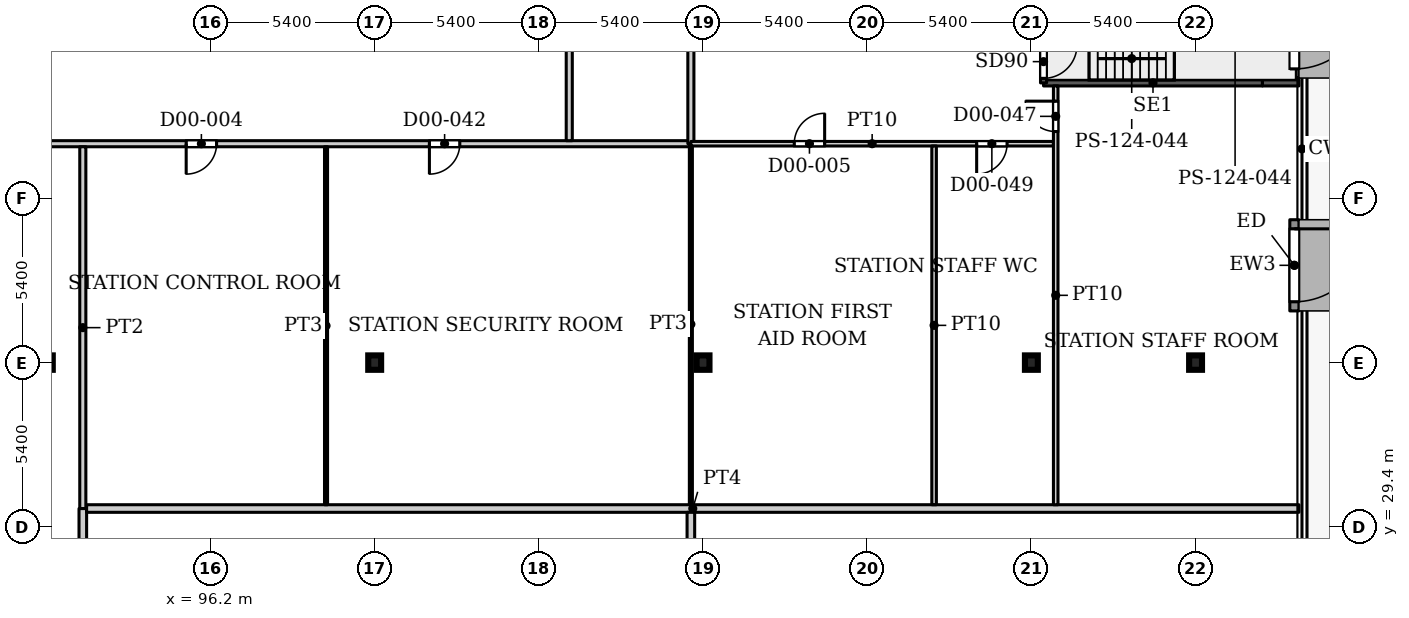
"""IFC4 building model, lengths in metres.
Left out: names, types, materials, properties, quantities, classifications, styles, units other than length and angle.
Written with IfcOpenShell. Run it as: python <this file> out.ifc"""

import sys

from ifc_helpers import new_model, si_unit, direction, frame, frame_2d, origin, origin_2d, place, context, subcontext, project, spatial, rectangle, i_section, extrude, source, transform, mapped, element, fill, save


model = new_model("IFC4")
c1 = context("Model", 3, precision=1e-05, world=origin(), true_north=direction((0.0, 1.0)))
c2 = subcontext(c1, "Body", "Model", "MODEL_VIEW")
j1 = project(units=[si_unit("LENGTHUNIT", "METRE"), si_unit("PLANEANGLEUNIT", "RADIAN")], contexts=[c1])
p1 = place(None, origin())
s1 = spatial("IfcSite", under=j1, at=p1, CompositionType="ELEMENT")
p2 = place(p1, origin())
s2 = spatial("IfcBuilding", under=s1, at=p2, CompositionType="ELEMENT")
p3 = place(p2, origin())
s3 = spatial("IfcBuildingStorey", under=s2, at=p3, CompositionType="ELEMENT", Elevation=0.0)
for number, where, z_axis, x_axis in (
    (1, (90.8, 34.8, 0.0), (0.0, 0.0, 1.0), (1.0, 0.0, 0.0)),
    (2, (101.6, 34.8, 0.0), (0.0, 0.0, 1.0), (1.0, 0.0, 0.0)),
    (3, (112.4, 34.8, 0.0), (0.0, 0.0, 1.0), (1.0, 0.0, 0.0)),
    (4, (123.2, 34.8, 0.0), (0.0, 0.0, 1.0), (1.0, 0.0, 0.0)),
    (5, (128.6, 34.8, 0.0), (0.0, 0.0, 1.0), (1.0, 0.0, 0.0)),
):
    element("IfcColumn", number, at=place(p3, frame(where, z_axis=z_axis, x_axis=x_axis)), inside=s3, PredefinedType="COLUMN", context=c2, shape_type="SweptSolid", body=[
        extrude(i_section(OverallWidth=0.424, OverallDepth=0.474, WebThickness=0.048, FlangeThickness=0.077, FilletRadius=0.014, at=origin_2d()), origin(), (0.0, 0.0, 1.0), 7.5),
    ])
p4 = place(p3, frame((131.85, 47.16, 0.0), z_axis=(0.0, 0.0, 1.0), x_axis=(0.0, -1.0, 0.0)))
e6 = element("IfcWall", 6, at=p4, inside=s3, PredefinedType="SOLIDWALL", context=c2, shape_type="SweptSolid", body=[
    extrude(rectangle(XDim=3.0, YDim=0.3, at=frame_2d((1.5, 0.0))), origin(), (0.0, 0.0, 1.0), 7.25),
])
p5 = place(p4, frame((0.3, 0.0, 0.0)))
e7 = element("IfcOpeningElement", 7, at=p5, cuts=e6, PredefinedType="OPENING", context=c2, shape_type="SweptSolid", body=[
    extrude(rectangle(XDim=2.4, YDim=2.7, at=frame_2d((1.2, 1.35))), frame((0.0, 0.16, 0.0), z_axis=(0.0, -1.0, 0.0), x_axis=(1.0, 0.0, 0.0)), (0.0, 0.0, 1.0), 0.32),
])
p6 = place(p3, frame((131.85, 39.5, 0.0), z_axis=(0.0, 0.0, 1.0), x_axis=(0.0, -1.0, 0.0)))
e8 = element("IfcWall", 8, at=p6, inside=s3, PredefinedType="SOLIDWALL", context=c2, shape_type="SweptSolid", body=[
    extrude(rectangle(XDim=3.0, YDim=0.3, at=frame_2d((1.5, 0.0))), origin(), (0.0, 0.0, 1.0), 7.25),
])
p7 = place(p6, frame((0.3, 0.0, 0.0)))
e9 = element("IfcOpeningElement", 9, at=p7, cuts=e8, PredefinedType="OPENING", context=c2, shape_type="SweptSolid", body=[
    extrude(rectangle(XDim=2.4, YDim=2.7, at=frame_2d((1.2, 1.35))), frame((0.0, 0.16, 0.0), z_axis=(0.0, -1.0, 0.0), x_axis=(1.0, 0.0, 0.0)), (0.0, 0.0, 1.0), 0.32),
])
p8 = place(p3, frame((123.6, 44.0, 0.0), z_axis=(0.0, 0.0, 1.0), x_axis=(1.0, 0.0, 0.0)))
e10 = element("IfcWall", 10, at=p8, inside=s3, PredefinedType="SHEAR", context=c2, shape_type="SweptSolid", body=[
    extrude(rectangle(XDim=7.2, YDim=0.2, at=frame_2d((3.6, 0.0))), origin(), (0.0, 0.0, 1.0), 7.5),
])
p9 = place(p3, frame((130.8, 44.0, 0.0), z_axis=(0.0, 0.0, 1.0), x_axis=(1.0, 0.0, 0.0)))
e11 = element("IfcWall", 11, at=p9, inside=s3, PredefinedType="SHEAR", context=c2, shape_type="SweptSolid", body=[
    extrude(rectangle(XDim=1.2, YDim=0.2, at=frame_2d((0.6, 0.0))), origin(), (0.0, 0.0, 1.0), 7.5),
])
p10 = place(p3, frame((123.6, 44.0, 0.0), z_axis=(0.0, 0.0, 1.0), x_axis=(0.0, 1.0, 0.0)))
e12 = element("IfcWall", 12, at=p10, inside=s3, PredefinedType="SHEAR", context=c2, shape_type="SweptSolid", body=[
    extrude(rectangle(XDim=3.15, YDim=0.2, at=frame_2d((1.575, 0.0))), origin(), (0.0, 0.0, 1.0), 7.5),
])
p11 = place(p10, frame((0.15, 0.0, 0.0)))
e13 = element("IfcOpeningElement", 13, at=p11, cuts=e12, PredefinedType="OPENING", context=c2, shape_type="SweptSolid", body=[
    extrude(rectangle(XDim=1.1, YDim=2.2, at=frame_2d((0.55, 1.1))), frame((0.0, 0.11, 0.0), z_axis=(0.0, -1.0, 0.0), x_axis=(1.0, 0.0, 0.0)), (0.0, 0.0, 1.0), 0.22),
])
p12 = place(p3, frame((47.9, 42.0, 0.0), z_axis=(0.0, 0.0, 1.0), x_axis=(1.0, 0.0, 0.0)))
e14 = element("IfcWall", 14, at=p12, inside=s3, PredefinedType="PARTITIONING", context=c2, shape_type="SweptSolid", body=[
    extrude(rectangle(XDim=64.1, YDim=0.2, at=frame_2d((32.05, 0.0))), origin(), (0.0, 0.0, 1.0), 7.08),
])
p13 = place(p12, frame((47.5, 0.0, 0.0)))
e15 = element("IfcOpeningElement", 15, at=p13, cuts=e14, PredefinedType="OPENING", context=c2, shape_type="SweptSolid", body=[
    extrude(rectangle(XDim=1.0, YDim=2.1, at=frame_2d((0.5, 1.05))), frame((0.0, 0.11, 0.0), z_axis=(0.0, -1.0, 0.0), x_axis=(1.0, 0.0, 0.0)), (0.0, 0.0, 1.0), 0.22),
])
p14 = place(p12, frame((55.5, 0.0, 0.0)))
e16 = element("IfcOpeningElement", 16, at=p14, cuts=e14, PredefinedType="OPENING", context=c2, shape_type="SweptSolid", body=[
    extrude(rectangle(XDim=1.0, YDim=2.1, at=frame_2d((0.5, 1.05))), frame((0.0, 0.11, 0.0), z_axis=(0.0, -1.0, 0.0), x_axis=(1.0, 0.0, 0.0)), (0.0, 0.0, 1.0), 0.22),
])
p15 = place(p3, frame((92.0, 20.725, 0.0), z_axis=(0.0, 0.0, 1.0), x_axis=(0.0, 1.0, 0.0)))
e17 = element("IfcWall", 17, at=p15, inside=s3, PredefinedType="PARTITIONING", context=c2, shape_type="SweptSolid", body=[
    extrude(rectangle(XDim=9.275, YDim=0.25, at=frame_2d((4.637, 0.0))), origin(), (0.0, 0.0, 1.0), 7.08),
])
p16 = place(p3, frame((92.0, 30.0, 0.0), z_axis=(0.0, 0.0, 1.0), x_axis=(0.0, 1.0, 0.0)))
e18 = element("IfcWall", 18, at=p16, inside=s3, PredefinedType="PARTITIONING", context=c2, shape_type="SweptSolid", body=[
    extrude(rectangle(XDim=11.9, YDim=0.2, at=frame_2d((5.95, 0.0))), origin(), (0.0, 0.0, 1.0), 7.08),
])
p17 = place(p3, frame((92.125, 30.0, 0.0), z_axis=(0.0, 0.0, 1.0), x_axis=(1.0, 0.0, 0.0)))
e19 = element("IfcWall", 19, at=p17, inside=s3, PredefinedType="PARTITIONING", context=c2, shape_type="SweptSolid", body=[
    extrude(rectangle(XDim=39.875, YDim=0.25, at=frame_2d((19.938, 0.0))), origin(), (0.0, 0.0, 1.0), 7.08),
])
p18 = place(p3, frame((100.0, 30.125, 0.0), z_axis=(0.0, 0.0, 1.0), x_axis=(0.0, 1.0, 0.0)))
e20 = element("IfcWall", 20, at=p18, inside=s3, PredefinedType="PARTITIONING", context=c2, shape_type="SweptSolid", body=[
    extrude(rectangle(XDim=11.775, YDim=0.1, at=frame_2d((5.887, 0.0))), origin(), (0.0, 0.0, 1.0), 7.08),
])
p19 = place(p3, frame((108.0, 42.1, 0.0), z_axis=(0.0, 0.0, 1.0), x_axis=(0.0, 1.0, 0.0)))
e21 = element("IfcWall", 21, at=p19, inside=s3, PredefinedType="PARTITIONING", context=c2, shape_type="SweptSolid", body=[
    extrude(rectangle(XDim=35.9, YDim=0.2, at=frame_2d((17.95, 0.0))), origin(), (0.0, 0.0, 1.0), 7.08),
])
p20 = place(p19, frame((16.5, 0.0, 0.0)))
e22 = element("IfcOpeningElement", 22, at=p20, cuts=e21, PredefinedType="OPENING", context=c2, shape_type="SweptSolid", body=[
    extrude(rectangle(XDim=3.0, YDim=2.1, at=frame_2d((1.5, 1.05))), frame((0.0, 0.11, 0.0), z_axis=(0.0, -1.0, 0.0), x_axis=(1.0, 0.0, 0.0)), (0.0, 0.0, 1.0), 0.22),
])
p21 = place(p3, frame((112.0, 20.725, 0.0), z_axis=(0.0, 0.0, 1.0), x_axis=(0.0, 1.0, 0.0)))
e23 = element("IfcWall", 23, at=p21, inside=s3, PredefinedType="PARTITIONING", context=c2, shape_type="SweptSolid", body=[
    extrude(rectangle(XDim=9.15, YDim=0.25, at=frame_2d((4.575, 0.0))), origin(), (0.0, 0.0, 1.0), 7.08),
])
p22 = place(p3, frame((112.0, 30.125, 0.0), z_axis=(0.0, 0.0, 1.0), x_axis=(0.0, 1.0, 0.0)))
e24 = element("IfcWall", 24, at=p22, inside=s3, PredefinedType="PARTITIONING", context=c2, shape_type="SweptSolid", body=[
    extrude(rectangle(XDim=11.875, YDim=0.1, at=frame_2d((5.938, 0.0))), origin(), (0.0, 0.0, 1.0), 7.08),
])
p23 = place(p3, frame((112.0, 42.0, 0.0), z_axis=(0.0, 0.0, 1.0), x_axis=(0.0, 1.0, 0.0)))
e25 = element("IfcWall", 25, at=p23, inside=s3, PredefinedType="PARTITIONING", context=c2, shape_type="SweptSolid", body=[
    extrude(rectangle(XDim=22.0, YDim=0.2, at=frame_2d((11.0, 0.0))), origin(), (0.0, 0.0, 1.0), 7.08),
])
p24 = place(p23, frame((9.6, 0.0, 0.0)))
e26 = element("IfcOpeningElement", 26, at=p24, cuts=e25, PredefinedType="OPENING", context=c2, shape_type="SweptSolid", body=[
    extrude(rectangle(XDim=3.0, YDim=2.1, at=frame_2d((1.5, 1.05))), frame((0.0, 0.11, 0.0), z_axis=(0.0, -1.0, 0.0), x_axis=(1.0, 0.0, 0.0)), (0.0, 0.0, 1.0), 0.22),
])
p25 = place(p3, frame((112.0, 42.0, 0.0), z_axis=(0.0, 0.0, 1.0), x_axis=(1.0, 0.0, 0.0)))
e27 = element("IfcWall", 27, at=p25, inside=s3, PredefinedType="PARTITIONING", context=c2, shape_type="SweptSolid", body=[
    extrude(rectangle(XDim=11.925, YDim=0.15, at=frame_2d((5.962, 0.0))), origin(), (0.0, 0.0, 1.0), 7.08),
])
p26 = place(p25, frame((3.4, 0.0, 0.0)))
e28 = element("IfcOpeningElement", 28, at=p26, cuts=e27, PredefinedType="OPENING", context=c2, shape_type="SweptSolid", body=[
    extrude(rectangle(XDim=1.0, YDim=2.1, at=frame_2d((0.5, 1.05))), frame((0.0, 0.085, 0.0), z_axis=(0.0, -1.0, 0.0), x_axis=(1.0, 0.0, 0.0)), (0.0, 0.0, 1.0), 0.17),
])
p27 = place(p25, frame((9.4, 0.0, 0.0)))
e29 = element("IfcOpeningElement", 29, at=p27, cuts=e27, PredefinedType="OPENING", context=c2, shape_type="SweptSolid", body=[
    extrude(rectangle(XDim=1.0, YDim=2.1, at=frame_2d((0.5, 1.05))), frame((0.0, 0.085, 0.0), z_axis=(0.0, -1.0, 0.0), x_axis=(1.0, 0.0, 0.0)), (0.0, 0.0, 1.0), 0.17),
])
p28 = place(p3, frame((120.0, 30.125, 0.0), z_axis=(0.0, 0.0, 1.0), x_axis=(0.0, 1.0, 0.0)))
e30 = element("IfcWall", 30, at=p28, inside=s3, PredefinedType="PARTITIONING", context=c2, shape_type="SweptSolid", body=[
    extrude(rectangle(XDim=11.8, YDim=0.15, at=frame_2d((5.9, 0.0))), origin(), (0.0, 0.0, 1.0), 7.08),
])
p29 = place(p3, frame((124.0, 30.125, 0.0), z_axis=(0.0, 0.0, 1.0), x_axis=(0.0, 1.0, 0.0)))
e31 = element("IfcWall", 31, at=p29, inside=s3, PredefinedType="PARTITIONING", context=c2, shape_type="SweptSolid", body=[
    extrude(rectangle(XDim=13.776, YDim=0.15, at=frame_2d((6.888, 0.0))), origin(), (0.0, 0.0, 1.0), 7.08),
])
p30 = place(p29, frame((12.275, 0.0, 0.0)))
e32 = element("IfcOpeningElement", 32, at=p30, cuts=e31, PredefinedType="OPENING", context=c2, shape_type="SweptSolid", body=[
    extrude(rectangle(XDim=1.0, YDim=2.1, at=frame_2d((0.5, 1.05))), frame((0.0, 0.085, 0.0), z_axis=(0.0, -1.0, 0.0), x_axis=(1.0, 0.0, 0.0)), (0.0, 0.0, 1.0), 0.17),
])
m1 = source(origin(), c2, "Body", "SweptSolid", [
    extrude(rectangle(XDim=2.4, YDim=2.7, at=frame_2d((1.2, 1.35))), frame((0.0, 0.025, 0.0), z_axis=(0.0, -1.0, 0.0), x_axis=(1.0, 0.0, 0.0)), (0.0, 0.0, 1.0), 0.05),
])
p31 = place(p5, origin())
e33 = element("IfcDoor", 33, at=p31, inside=s3, OperationType="DOUBLE_DOOR_SINGLE_SWING", PredefinedType="DOOR", context=c2, shape_type="MappedRepresentation", body=[
    mapped(m1, transform((0.0, 0.0, 0.0), x_axis=(1.0, 0.0, 0.0), y_axis=(0.0, 1.0, 0.0), z_axis=(0.0, 0.0, 1.0), scale=1.0)),
])
fill(e7, e33)
p32 = place(p7, origin())
e34 = element("IfcDoor", 34, at=p32, inside=s3, OperationType="DOUBLE_DOOR_SINGLE_SWING", PredefinedType="DOOR", context=c2, shape_type="MappedRepresentation", body=[
    mapped(m1, transform((0.0, 0.0, 0.0), x_axis=(1.0, 0.0, 0.0), y_axis=(0.0, 1.0, 0.0), z_axis=(0.0, 0.0, 1.0), scale=1.0)),
])
fill(e9, e34)
m2 = source(origin(), c2, "Body", "SweptSolid", [
    extrude(rectangle(XDim=1.1, YDim=2.2, at=frame_2d((0.55, 1.1))), frame((0.0, 0.025, 0.0), z_axis=(0.0, -1.0, 0.0), x_axis=(1.0, 0.0, 0.0)), (0.0, 0.0, 1.0), 0.05),
])
p33 = place(p11, origin())
e35 = element("IfcDoor", 35, at=p33, inside=s3, OperationType="SINGLE_SWING_RIGHT", PredefinedType="DOOR", context=c2, shape_type="MappedRepresentation", body=[
    mapped(m2, transform((0.0, 0.0, 0.0), x_axis=(1.0, 0.0, 0.0), y_axis=(0.0, 1.0, 0.0), z_axis=(0.0, 0.0, 1.0), scale=1.0)),
])
fill(e13, e35)
m3 = source(origin(), c2, "Body", "SweptSolid", [
    extrude(rectangle(XDim=1.0, YDim=2.1, at=frame_2d((0.5, 1.05))), frame((0.0, 0.025, 0.0), z_axis=(0.0, -1.0, 0.0), x_axis=(1.0, 0.0, 0.0)), (0.0, 0.0, 1.0), 0.05),
])
p34 = place(p13, origin())
e36 = element("IfcDoor", 36, at=p34, inside=s3, OperationType="SINGLE_SWING_RIGHT", PredefinedType="DOOR", context=c2, shape_type="MappedRepresentation", body=[
    mapped(m3, transform((0.0, 0.0, 0.0), x_axis=(1.0, 0.0, 0.0), y_axis=(0.0, 1.0, 0.0), z_axis=(0.0, 0.0, 1.0), scale=1.0)),
])
fill(e15, e36)
m4 = source(origin(), c2, "Body", "SweptSolid", [
    extrude(rectangle(XDim=1.0, YDim=2.1, at=frame_2d((0.5, 1.05))), frame((0.0, 0.025, 0.0), z_axis=(0.0, -1.0, 0.0), x_axis=(1.0, 0.0, 0.0)), (0.0, 0.0, 1.0), 0.05),
])
p35 = place(p26, origin())
e37 = element("IfcDoor", 37, at=p35, inside=s3, OperationType="SINGLE_SWING_LEFT", PredefinedType="DOOR", context=c2, shape_type="MappedRepresentation", body=[
    mapped(m4, transform((0.0, 0.0, 0.0), x_axis=(1.0, 0.0, 0.0), y_axis=(0.0, 1.0, 0.0), z_axis=(0.0, 0.0, 1.0), scale=1.0)),
])
fill(e28, e37)
p36 = place(p14, origin())
e38 = element("IfcDoor", 38, at=p36, inside=s3, OperationType="SINGLE_SWING_RIGHT", PredefinedType="DOOR", context=c2, shape_type="MappedRepresentation", body=[
    mapped(m3, transform((0.0, 0.0, 0.0), x_axis=(1.0, 0.0, 0.0), y_axis=(0.0, 1.0, 0.0), z_axis=(0.0, 0.0, 1.0), scale=1.0)),
])
fill(e16, e38)
p37 = place(p30, origin())
e39 = element("IfcDoor", 39, at=p37, inside=s3, OperationType="SINGLE_SWING_LEFT", PredefinedType="DOOR", context=c2, shape_type="MappedRepresentation", body=[
    mapped(m4, transform((0.0, 0.0, 0.0), x_axis=(1.0, 0.0, 0.0), y_axis=(0.0, 1.0, 0.0), z_axis=(0.0, 0.0, 1.0), scale=1.0)),
])
fill(e32, e39)
p38 = place(p27, origin())
e40 = element("IfcDoor", 40, at=p38, inside=s3, OperationType="SINGLE_SWING_RIGHT", PredefinedType="DOOR", context=c2, shape_type="MappedRepresentation", body=[
    mapped(m4, transform((0.0, 0.0, 0.0), x_axis=(1.0, 0.0, 0.0), y_axis=(0.0, 1.0, 0.0), z_axis=(0.0, 0.0, 1.0), scale=1.0)),
])
fill(e29, e40)
save(model, sys.argv[1])
